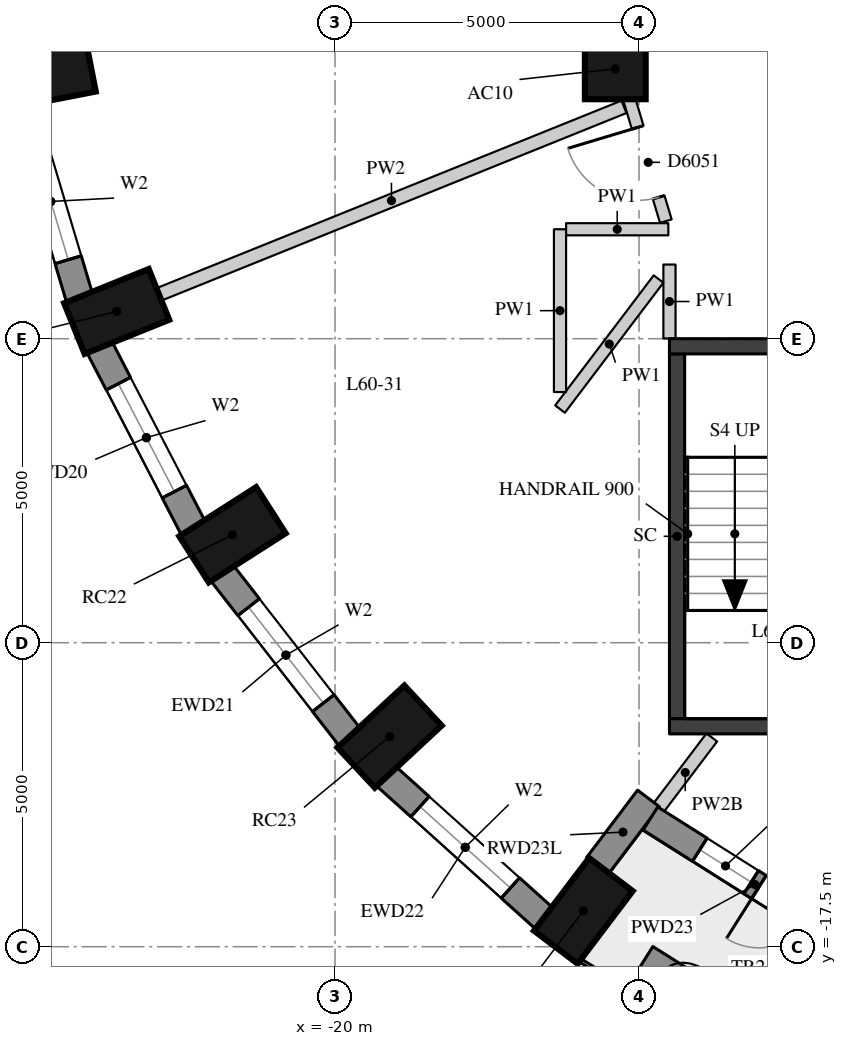
"""IFC4 building model, lengths in metres.
Left out: names, types, materials, properties, quantities, classifications, styles, units other than length and angle.
Written with IfcOpenShell. Run it as: python <this file> out.ifc"""

import sys

from ifc_helpers import new_model, si_unit, direction, frame, frame_2d, origin, origin_2d, place, context, subcontext, project, spatial, rectangle, extrude, element, fill, save


model = new_model("IFC4")
c1 = context("Model", 3, precision=1e-05, world=origin(), true_north=direction((0.0, 1.0)))
c2 = subcontext(c1, "Body", "Model", "MODEL_VIEW")
j1 = project(units=[si_unit("LENGTHUNIT", "METRE"), si_unit("PLANEANGLEUNIT", "RADIAN")], contexts=[c1])
p1 = place(None, origin())
s1 = spatial("IfcSite", under=j1, at=p1, CompositionType="ELEMENT")
p2 = place(p1, origin())
s2 = spatial("IfcBuilding", under=s1, at=p2, CompositionType="ELEMENT")
p3 = place(p2, frame((0.0, 0.0, 212.3)))
s3 = spatial("IfcBuildingStorey", under=s2, at=p3, CompositionType="ELEMENT", Elevation=212.3)
for number, where, z_axis, x_axis in (
    (1, (-24.757, -3.137, 0.0), (0.0, 0.0, 1.0), (-0.981, -0.192, 0.0)),
    (2, (-23.591, -7.052, 0.0), (0.0, 0.0, 1.0), (-0.927, -0.374, 0.0)),
    (3, (-21.687, -10.725, 0.0), (0.0, 0.0, 1.0), (-0.842, -0.539, 0.0)),
    (4, (-19.102, -14.045, 0.0), (0.0, 0.0, 1.0), (-0.732, -0.681, 0.0)),
    (5, (-15.916, -16.911, 0.0), (0.0, 0.0, 1.0), (-0.604, -0.797, 0.0)),
):
    element("IfcColumn", number, at=place(p3, frame(where, z_axis=z_axis, x_axis=x_axis)), inside=s3, PredefinedType="COLUMN", context=c2, shape_type="SweptSolid", body=[
        extrude(rectangle(XDim=1.5, YDim=0.9, at=origin_2d()), origin(), (0.0, 0.0, 1.0), 3.3),
    ])
p4 = place(p3, frame((-15.391, -3.062, 0.0), z_axis=(0.0, 0.0, 1.0), x_axis=(1.0, 0.0, 0.0)))
e6 = element("IfcColumn", 6, at=p4, inside=s3, PredefinedType="COLUMN", context=c2, shape_type="SweptSolid", body=[
    extrude(rectangle(XDim=1.0, YDim=1.0, at=origin_2d()), origin(), (0.0, 0.0, 1.0), 3.3),
])
p5 = place(p3, frame((-25.148, -3.652, 0.0), z_axis=(0.0, 0.0, 1.0), x_axis=(0.285444972963, -0.958395099847, 0.0)))
e7 = element("IfcWall", 7, at=p5, inside=s3, PredefinedType="SOLIDWALL", context=c2, shape_type="SweptSolid", body=[
    extrude(rectangle(XDim=3.32, YDim=0.45, at=frame_2d((1.66, 0.0))), origin(), (0.0, 0.0, 1.0), 3.02),
])
p6 = place(p5, frame((0.66, 0.0, 0.4)))
e8 = element("IfcOpeningElement", 8, at=p6, cuts=e7, PredefinedType="OPENING", context=c2, shape_type="SweptSolid", body=[
    extrude(rectangle(XDim=2.0, YDim=1.75, at=frame_2d((1.0, 0.875))), frame((0.0, 0.235, 0.0), z_axis=(0.0, -1.0, 0.0), x_axis=(1.0, 0.0, 0.0)), (0.0, 0.0, 1.0), 0.47),
])
p7 = place(p3, frame((-23.878, -7.632, 0.0), z_axis=(0.0, 0.0, 1.0), x_axis=(0.460232593174, -0.887798378113, 0.0)))
e9 = element("IfcWall", 9, at=p7, inside=s3, PredefinedType="SOLIDWALL", context=c2, shape_type="SweptSolid", body=[
    extrude(rectangle(XDim=3.371, YDim=0.45, at=frame_2d((1.685, 0.0))), origin(), (0.0, 0.0, 1.0), 3.02),
])
p8 = place(p7, frame((0.685, 0.0, 0.4)))
e10 = element("IfcOpeningElement", 10, at=p8, cuts=e9, PredefinedType="OPENING", context=c2, shape_type="SweptSolid", body=[
    extrude(rectangle(XDim=2.0, YDim=1.75, at=frame_2d((1.0, 0.875))), frame((0.0, 0.235, 0.0), z_axis=(0.0, -1.0, 0.0), x_axis=(1.0, 0.0, 0.0)), (0.0, 0.0, 1.0), 0.47),
])
p9 = place(p3, frame((-21.863, -11.348, 0.0), z_axis=(0.0, 0.0, 1.0), x_axis=(0.614255239631, -0.789107407509, 0.0)))
e11 = element("IfcWall", 11, at=p9, inside=s3, PredefinedType="SOLIDWALL", context=c2, shape_type="SweptSolid", body=[
    extrude(rectangle(XDim=3.438, YDim=0.45, at=frame_2d((1.719, 0.0))), origin(), (0.0, 0.0, 1.0), 3.02),
])
p10 = place(p9, frame((0.719, 0.0, 0.4)))
e12 = element("IfcOpeningElement", 12, at=p10, cuts=e11, PredefinedType="OPENING", context=c2, shape_type="SweptSolid", body=[
    extrude(rectangle(XDim=2.0, YDim=1.75, at=frame_2d((1.0, 0.875))), frame((0.0, 0.235, 0.0), z_axis=(0.0, -1.0, 0.0), x_axis=(1.0, 0.0, 0.0)), (0.0, 0.0, 1.0), 0.47),
])
p11 = place(p3, frame((-19.165, -14.69, 0.0), z_axis=(0.0, 0.0, 1.0), x_axis=(0.743442727602, -0.668799604348, 0.0)))
e13 = element("IfcWall", 13, at=p11, inside=s3, PredefinedType="SOLIDWALL", context=c2, shape_type="SweptSolid", body=[
    extrude(rectangle(XDim=3.513, YDim=0.45, at=frame_2d((1.756, 0.0))), origin(), (0.0, 0.0, 1.0), 3.02),
])
p12 = place(p11, frame((0.756, 0.0, 0.4)))
e14 = element("IfcOpeningElement", 14, at=p12, cuts=e13, PredefinedType="OPENING", context=c2, shape_type="SweptSolid", body=[
    extrude(rectangle(XDim=2.0, YDim=1.75, at=frame_2d((1.0, 0.875))), frame((0.0, 0.235, 0.0), z_axis=(0.0, -1.0, 0.0), x_axis=(1.0, 0.0, 0.0)), (0.0, 0.0, 1.0), 0.47),
])
p13 = place(p3, frame((-15.685, -16.17, 0.0), z_axis=(0.0, 0.0, 1.0), x_axis=(0.603644757989, 0.797253414011, 0.0)))
e15 = element("IfcWall", 15, at=p13, inside=s3, PredefinedType="SOLIDWALL", context=c2, shape_type="SweptSolid", body=[
    extrude(rectangle(XDim=1.391, YDim=0.45, at=frame_2d((0.695, 0.0))), origin(), (0.0, 0.0, 1.0), 2.57),
])
p14 = place(p3, frame((-14.813, -15.392, 0.0), z_axis=(0.0, 0.0, 1.0), x_axis=(0.84545185308, -0.534051649303, 0.0)))
e16 = element("IfcWall", 16, at=p14, inside=s3, PredefinedType="SOLIDWALL", context=c2, shape_type="SweptSolid", body=[
    extrude(rectangle(XDim=4.071, YDim=0.45, at=frame_2d((2.036, 0.0))), origin(), (0.0, 0.0, 1.0), 3.02),
])
p15 = place(p14, frame((0.961, 0.0, 0.4)))
e17 = element("IfcOpeningElement", 17, at=p15, cuts=e16, PredefinedType="OPENING", context=c2, shape_type="SweptSolid", body=[
    extrude(rectangle(XDim=1.0, YDim=1.75, at=frame_2d((0.5, 0.875))), frame((0.0, 0.235, 0.0), z_axis=(0.0, -1.0, 0.0), x_axis=(1.0, 0.0, 0.0)), (0.0, 0.0, 1.0), 0.47),
])
p16 = place(p14, frame((2.111, 0.0, 0.0)))
e18 = element("IfcOpeningElement", 18, at=p16, cuts=e16, PredefinedType="OPENING", context=c2, shape_type="SweptSolid", body=[
    extrude(rectangle(XDim=1.0, YDim=2.15, at=frame_2d((0.5, 1.075))), frame((0.0, 0.235, 0.0), z_axis=(0.0, -1.0, 0.0), x_axis=(1.0, 0.0, 0.0)), (0.0, 0.0, 1.0), 0.47),
])
p17 = place(p3, frame((-14.96, -17.793, 0.0), z_axis=(0.0, 0.0, 1.0), x_axis=(0.846126379677, -0.532982316418, 0.0)))
e19 = element("IfcWall", 19, at=p17, inside=s3, PredefinedType="USERDEFINED", context=c2, shape_type="SweptSolid", body=[
    extrude(rectangle(XDim=1.8, YDim=0.7, at=frame_2d((0.9, 0.0))), origin(), (0.0, 0.0, 1.0), 0.75),
])
p18 = place(p3, frame((-14.375, -13.75, -0.28), z_axis=(0.0, 0.0, 1.0), x_axis=(0.0, 1.0, 0.0)))
e20 = element("IfcWall", 20, at=p18, inside=s3, PredefinedType="SHEAR", context=c2, shape_type="SweptSolid", body=[
    extrude(rectangle(XDim=6.0, YDim=0.25, at=frame_2d((3.0, 0.0))), origin(), (0.0, 0.0, 1.0), 3.3),
])
for number, where, z_axis, x_axis in (
    (21, (-14.5, -7.625, -0.28), (0.0, 0.0, 1.0), (1.0, 0.0, 0.0)),
    (22, (-14.5, -13.875, -0.28), (0.0, 0.0, 1.0), (1.0, 0.0, 0.0)),
):
    element("IfcWall", number, at=place(p3, frame(where, z_axis=z_axis, x_axis=x_axis)), inside=s3, PredefinedType="SHEAR", context=c2, shape_type="SweptSolid", body=[
        extrude(rectangle(XDim=5.2, YDim=0.25, at=frame_2d((2.6, 0.0))), origin(), (0.0, 0.0, 1.0), 3.3),
    ])
p19 = place(p3, frame((-14.5, -7.496, 0.0), z_axis=(0.0, 0.0, 1.0), x_axis=(0.0, 1.0, 0.0)))
e23 = element("IfcWall", 23, at=p19, inside=s3, PredefinedType="PARTITIONING", context=c2, shape_type="SweptSolid", body=[
    extrude(rectangle(XDim=1.216, YDim=0.2, at=frame_2d((0.608, 0.0))), origin(), (0.0, 0.0, 1.0), 3.02),
])
p20 = place(p3, frame((-14.679, -6.518, 0.0), z_axis=(0.0, 0.0, 1.0), x_axis=(-0.603820908912, -0.797120009761, 0.0)))
e24 = element("IfcWall", 24, at=p20, inside=s3, PredefinedType="PARTITIONING", context=c2, shape_type="SweptSolid", body=[
    extrude(rectangle(XDim=2.684, YDim=0.2, at=frame_2d((1.342, 0.0))), origin(), (0.0, 0.0, 1.0), 3.02),
])
p21 = place(p3, frame((-16.3, -8.377, 0.0), z_axis=(0.0, 0.0, 1.0), x_axis=(0.0, 1.0, 0.0)))
e25 = element("IfcWall", 25, at=p21, inside=s3, PredefinedType="PARTITIONING", context=c2, shape_type="SweptSolid", body=[
    extrude(rectangle(XDim=2.677, YDim=0.2, at=frame_2d((1.339, 0.0))), origin(), (0.0, 0.0, 1.0), 3.02),
])
p22 = place(p3, frame((-16.2, -5.7, 0.0), z_axis=(0.0, 0.0, 1.0), x_axis=(1.0, 0.0, 0.0)))
e26 = element("IfcWall", 26, at=p22, inside=s3, PredefinedType="PARTITIONING", context=c2, shape_type="SweptSolid", body=[
    extrude(rectangle(XDim=1.681, YDim=0.2, at=frame_2d((0.841, 0.0))), origin(), (0.0, 0.0, 1.0), 3.02),
])
p23 = place(p3, frame((-14.56, -5.567, 0.0), z_axis=(0.0, 0.0, 1.0), x_axis=(-0.287410918602, 0.95780737305, 0.0)))
e27 = element("IfcWall", 27, at=p23, inside=s3, PredefinedType="PARTITIONING", context=c2, shape_type="SweptSolid", body=[
    extrude(rectangle(XDim=6.751, YDim=0.2, at=frame_2d((3.376, 0.0))), origin(), (0.0, 0.0, 1.0), 2.52),
])
p24 = place(p23, frame((3.561, 0.0, 0.0)))
e28 = element("IfcOpeningElement", 28, at=p24, cuts=e27, PredefinedType="OPENING", context=c2, shape_type="SweptSolid", body=[
    extrude(rectangle(XDim=1.1, YDim=2.1, at=frame_2d((0.55, 1.05))), frame((0.0, 0.11, 0.0), z_axis=(0.0, -1.0, 0.0), x_axis=(1.0, 0.0, 0.0)), (0.0, 0.0, 1.0), 0.22),
])
p25 = place(p23, frame((0.41, 0.0, 0.0)))
e29 = element("IfcOpeningElement", 29, at=p25, cuts=e27, PredefinedType="OPENING", context=c2, shape_type="SweptSolid", body=[
    extrude(rectangle(XDim=1.2, YDim=2.1, at=frame_2d((0.6, 1.05))), frame((0.0, 0.11, 0.0), z_axis=(0.0, -1.0, 0.0), x_axis=(1.0, 0.0, 0.0)), (0.0, 0.0, 1.0), 0.22),
])
p26 = place(p3, frame((-22.896, -6.771, 0.0), z_axis=(0.0, 0.0, 1.0), x_axis=(0.92738233242, 0.374114968313, 0.0)))
e30 = element("IfcWall", 30, at=p26, inside=s3, PredefinedType="PARTITIONING", context=c2, shape_type="SweptSolid", body=[
    extrude(rectangle(XDim=8.246, YDim=0.22, at=frame_2d((4.123, 0.0))), origin(), (0.0, 0.0, 1.0), 3.02),
])
p27 = place(p3, frame((-14.677, -15.211, 0.0), z_axis=(0.0, 0.0, 1.0), x_axis=(0.603665965776, 0.797237355976, 0.0)))
e31 = element("IfcWall", 31, at=p27, inside=s3, PredefinedType="PARTITIONING", context=c2, shape_type="SweptSolid", body=[
    extrude(rectangle(XDim=1.447, YDim=0.22, at=frame_2d((0.723, 0.0))), origin(), (0.0, 0.0, 1.0), 2.57),
])
p28 = place(p3, frame((-11.927, -3.927, 0.0), z_axis=(0.0, 0.0, 1.0), x_axis=(-0.382730523909, 0.923860025149, 0.0)))
e32 = element("IfcWall", 32, at=p28, inside=s3, PredefinedType="PARTITIONING", context=c2, shape_type="SweptSolid", body=[
    extrude(rectangle(XDim=4.251, YDim=0.1, at=frame_2d((2.125, 0.0))), origin(), (0.0, 0.0, 1.0), 3.02),
])
p29 = place(p6, origin())
e33 = element("IfcWindow", 33, at=p29, inside=s3, PartitioningType="SINGLE_PANEL", PredefinedType="WINDOW", context=c2, shape_type="SweptSolid", body=[
    extrude(rectangle(XDim=2.0, YDim=1.75, at=frame_2d((1.0, 0.875))), frame((0.0, 0.035, 0.0), z_axis=(0.0, -1.0, 0.0), x_axis=(1.0, 0.0, 0.0)), (0.0, 0.0, 1.0), 0.06),
])
fill(e8, e33)
p30 = place(p8, origin())
e34 = element("IfcWindow", 34, at=p30, inside=s3, PartitioningType="SINGLE_PANEL", PredefinedType="WINDOW", context=c2, shape_type="SweptSolid", body=[
    extrude(rectangle(XDim=2.0, YDim=1.75, at=frame_2d((1.0, 0.875))), frame((0.0, 0.035, 0.0), z_axis=(0.0, -1.0, 0.0), x_axis=(1.0, 0.0, 0.0)), (0.0, 0.0, 1.0), 0.06),
])
fill(e10, e34)
p31 = place(p10, origin())
e35 = element("IfcWindow", 35, at=p31, inside=s3, PartitioningType="SINGLE_PANEL", PredefinedType="WINDOW", context=c2, shape_type="SweptSolid", body=[
    extrude(rectangle(XDim=2.0, YDim=1.75, at=frame_2d((1.0, 0.875))), frame((0.0, 0.035, 0.0), z_axis=(0.0, -1.0, 0.0), x_axis=(1.0, 0.0, 0.0)), (0.0, 0.0, 1.0), 0.06),
])
fill(e12, e35)
p32 = place(p12, origin())
e36 = element("IfcWindow", 36, at=p32, inside=s3, PartitioningType="SINGLE_PANEL", PredefinedType="WINDOW", context=c2, shape_type="SweptSolid", body=[
    extrude(rectangle(XDim=2.0, YDim=1.75, at=frame_2d((1.0, 0.875))), frame((0.0, 0.035, 0.0), z_axis=(0.0, -1.0, 0.0), x_axis=(1.0, 0.0, 0.0)), (0.0, 0.0, 1.0), 0.06),
])
fill(e14, e36)
p33 = place(p15, origin())
e37 = element("IfcWindow", 37, at=p33, inside=s3, PartitioningType="SINGLE_PANEL", PredefinedType="WINDOW", context=c2, shape_type="SweptSolid", body=[
    extrude(rectangle(XDim=1.0, YDim=1.75, at=frame_2d((0.5, 0.875))), frame((0.0, 0.035, 0.0), z_axis=(0.0, -1.0, 0.0), x_axis=(1.0, 0.0, 0.0)), (0.0, 0.0, 1.0), 0.06),
])
fill(e17, e37)
p34 = place(p16, frame((1.0, 0.0, 0.0), z_axis=(0.0, 0.0, 1.0), x_axis=(-1.0, 0.0, 0.0)))
e38 = element("IfcDoor", 38, at=p34, inside=s3, OperationType="SINGLE_SWING_RIGHT", PredefinedType="DOOR", context=c2, shape_type="SweptSolid", body=[
    extrude(rectangle(XDim=1.0, YDim=2.15, at=frame_2d((0.5, 1.075))), frame((0.0, 0.075, 0.0), z_axis=(0.0, -1.0, 0.0), x_axis=(1.0, 0.0, 0.0)), (0.0, 0.0, 1.0), 0.05),
])
fill(e18, e38)
p35 = place(p25, origin())
e39 = element("IfcDoor", 39, at=p35, inside=s3, OperationType="SINGLE_SWING_RIGHT", PredefinedType="DOOR", context=c2, shape_type="SweptSolid", body=[
    extrude(rectangle(XDim=1.2, YDim=2.1, at=frame_2d((0.6, 1.05))), frame((0.0, 0.025, 0.0), z_axis=(0.0, -1.0, 0.0), x_axis=(1.0, 0.0, 0.0)), (0.0, 0.0, 1.0), 0.05),
])
fill(e29, e39)
save(model, sys.argv[1])
